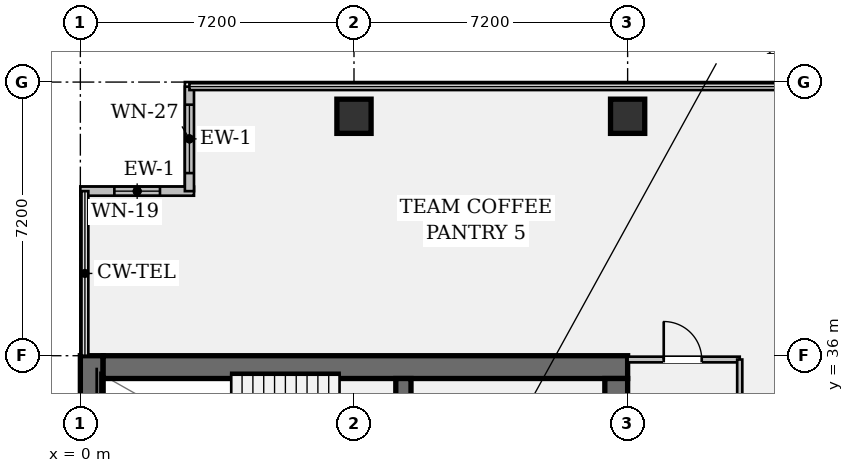
"""IFC4 building model, lengths in metres.
Left out: names, types, materials, properties, quantities, classifications, styles, units other than length and angle.
Written with IfcOpenShell. Run it as: python <this file> out.ifc"""

import sys

from ifc_helpers import new_model, si_unit, direction, frame, frame_2d, origin, origin_2d, place, context, subcontext, project, spatial, rectangle, hollow_rectangle, extrude, element, fill, save


model = new_model("IFC4")
c1 = context("Model", 3, precision=1e-05, world=origin(), true_north=direction((0.0, 1.0)))
c2 = subcontext(c1, "Body", "Model", "MODEL_VIEW")
j1 = project(units=[si_unit("LENGTHUNIT", "METRE"), si_unit("PLANEANGLEUNIT", "RADIAN")], contexts=[c1])
p1 = place(None, origin())
s1 = spatial("IfcSite", under=j1, at=p1, CompositionType="ELEMENT")
p2 = place(p1, origin())
s2 = spatial("IfcBuilding", under=s1, at=p2, CompositionType="ELEMENT")
p3 = place(p2, frame((0.0, 0.0, 121.45)))
s3 = spatial("IfcBuildingStorey", under=s2, at=p3, CompositionType="ELEMENT", Elevation=121.45)
p4 = place(p3, frame((0.3, 7.2, 0.0), z_axis=(0.0, 0.0, 1.0), x_axis=(0.0, 1.0, 0.0)))
e1 = element("IfcWall", 1, at=p4, inside=s3, PredefinedType="SHEAR", context=c2, shape_type="SweptSolid", body=[
    extrude(rectangle(XDim=28.8, YDim=0.6, at=frame_2d((14.4, 0.0))), origin(), (0.0, 0.0, 1.0), 3.58),
])
p5 = place(p3, frame((0.6, 35.7, 0.0), z_axis=(0.0, 0.0, 1.0), x_axis=(1.0, 0.0, 0.0)))
e2 = element("IfcWall", 2, at=p5, inside=s3, PredefinedType="SHEAR", context=c2, shape_type="SweptSolid", body=[
    extrude(rectangle(XDim=13.8, YDim=0.6, at=frame_2d((6.9, 0.0))), origin(), (0.0, 0.0, 1.0), 3.58),
])
p6 = place(p3, frame((14.1, 35.4, 0.0), z_axis=(0.0, 0.0, 1.0), x_axis=(0.0, -1.0, 0.0)))
e3 = element("IfcWall", 3, at=p6, inside=s3, PredefinedType="SHEAR", context=c2, shape_type="SweptSolid", body=[
    extrude(rectangle(XDim=27.6, YDim=0.6, at=frame_2d((13.8, 0.0))), origin(), (0.0, 0.0, 1.0), 3.58),
])
p7 = place(p6, frame((1.3, 0.0, 0.0)))
e4 = element("IfcOpeningElement", 4, at=p7, cuts=e3, PredefinedType="OPENING", context=c2, shape_type="SweptSolid", body=[
    extrude(rectangle(XDim=1.2, YDim=2.15, at=frame_2d((0.6, 1.075))), frame((0.0, 0.312, 0.0), z_axis=(0.0, -1.0, 0.0), x_axis=(1.0, 0.0, 0.0)), (0.0, 0.0, 1.0), 0.624),
])
p8 = place(p6, frame((25.25, 0.0, 0.0)))
e5 = element("IfcOpeningElement", 5, at=p8, cuts=e3, PredefinedType="OPENING", context=c2, shape_type="SweptSolid", body=[
    extrude(rectangle(XDim=1.2, YDim=2.15, at=frame_2d((0.6, 1.075))), frame((0.0, 0.312, 0.0), z_axis=(0.0, -1.0, 0.0), x_axis=(1.0, 0.0, 0.0)), (0.0, 0.0, 1.0), 0.624),
])
p9 = place(p6, frame((14.6, 0.0, 0.0)))
e6 = element("IfcOpeningElement", 6, at=p9, cuts=e3, PredefinedType="OPENING", context=c2, shape_type="SweptSolid", body=[
    extrude(rectangle(XDim=1.6, YDim=2.2, at=frame_2d((0.8, 1.1))), frame((0.0, 0.312, 0.0), z_axis=(0.0, -1.0, 0.0), x_axis=(1.0, 0.0, 0.0)), (0.0, 0.0, 1.0), 0.624),
])
p10 = place(p3, frame((8.5, 31.72, 0.0), z_axis=(0.0, 0.0, 1.0), x_axis=(0.0, 1.0, 0.0)))
e7 = element("IfcWall", 7, at=p10, inside=s3, PredefinedType="SHEAR", context=c2, shape_type="SweptSolid", body=[
    extrude(rectangle(XDim=3.68, YDim=0.4, at=frame_2d((1.84, 0.0))), origin(), (0.0, 0.0, 1.0), 3.58),
])
p11 = place(p10, frame((0.9, 0.0, 0.0)))
e8 = element("IfcOpeningElement", 8, at=p11, cuts=e7, PredefinedType="OPENING", context=c2, shape_type="SweptSolid", body=[
    extrude(rectangle(XDim=1.1, YDim=2.15, at=frame_2d((0.55, 1.075))), frame((0.0, 0.212, 0.0), z_axis=(0.0, -1.0, 0.0), x_axis=(1.0, 0.0, 0.0)), (0.0, 0.0, 1.0), 0.424),
])
for number, where, z_axis, x_axis in (
    (9, (7.2, 42.3, 0.0), (0.0, 0.0, 1.0), (1.0, 0.0, 0.0)),
    (10, (14.4, 42.3, 0.0), (0.0, 0.0, 1.0), (1.0, 0.0, 0.0)),
):
    element("IfcColumn", number, at=place(p3, frame(where, z_axis=z_axis, x_axis=x_axis)), inside=s3, PredefinedType="COLUMN", context=c2, shape_type="SweptSolid", body=[
        extrude(hollow_rectangle(XDim=0.9, YDim=0.9, WallThickness=0.055, at=origin_2d()), origin(), (0.0, 0.0, 1.0), 3.58),
    ])
p12 = place(p3, frame((0.0, 40.33, 0.0), z_axis=(0.0, 0.0, 1.0), x_axis=(1.0, 0.0, 0.0)))
e11 = element("IfcWall", 11, at=p12, inside=s3, PredefinedType="STANDARD", context=c2, shape_type="SweptSolid", body=[
    extrude(rectangle(XDim=2.99, YDim=0.24, at=frame_2d((1.495, 0.0))), origin(), (0.0, 0.0, 1.0), 3.58),
])
p13 = place(p12, frame((0.895, 0.0, 0.95)))
e12 = element("IfcOpeningElement", 12, at=p13, cuts=e11, PredefinedType="OPENING", context=c2, shape_type="SweptSolid", body=[
    extrude(rectangle(XDim=1.2, YDim=1.8, at=frame_2d((0.6, 0.9))), frame((0.0, 0.132, 0.0), z_axis=(0.0, -1.0, 0.0), x_axis=(1.0, 0.0, 0.0)), (0.0, 0.0, 1.0), 0.264),
])
p14 = place(p3, frame((2.87, 40.33, 0.0), z_axis=(0.0, 0.0, 1.0), x_axis=(0.0, 1.0, 0.0)))
e13 = element("IfcWall", 13, at=p14, inside=s3, PredefinedType="STANDARD", context=c2, shape_type="SweptSolid", body=[
    extrude(rectangle(XDim=2.75, YDim=0.24, at=frame_2d((1.375, 0.0))), origin(), (0.0, 0.0, 1.0), 3.58),
])
p15 = place(p14, frame((0.475, 0.0, 0.95)))
e14 = element("IfcOpeningElement", 14, at=p15, cuts=e13, PredefinedType="OPENING", context=c2, shape_type="SweptSolid", body=[
    extrude(rectangle(XDim=1.8, YDim=1.35, at=frame_2d((0.9, 0.675))), frame((0.0, 0.132, 0.0), z_axis=(0.0, -1.0, 0.0), x_axis=(1.0, 0.0, 0.0)), (0.0, 0.0, 1.0), 0.264),
])
p16 = place(p3, frame((14.4, 35.9, 0.0), z_axis=(0.0, 0.0, 1.0), x_axis=(1.0, 0.0, 0.0)))
e15 = element("IfcWall", 15, at=p16, inside=s3, PredefinedType="PARTITIONING", context=c2, shape_type="SweptSolid", body=[
    extrude(rectangle(XDim=2.95, YDim=0.15, at=frame_2d((1.475, 0.0))), origin(), (0.0, 0.0, 1.0), 2.869),
])
p17 = place(p16, frame((0.95, 0.0, 0.0)))
e16 = element("IfcOpeningElement", 16, at=p17, cuts=e15, PredefinedType="OPENING", context=c2, shape_type="SweptSolid", body=[
    extrude(rectangle(XDim=1.0, YDim=2.15, at=frame_2d((0.5, 1.075))), frame((0.0, 0.087, 0.0), z_axis=(0.0, -1.0, 0.0), x_axis=(1.0, 0.0, 0.0)), (0.0, 0.0, 1.0), 0.174),
])
p18 = place(p3, frame((17.35, 20.7, 0.0), z_axis=(0.0, 0.0, 1.0), x_axis=(0.0, 1.0, 0.0)))
e17 = element("IfcWall", 17, at=p18, inside=s3, PredefinedType="PARTITIONING", context=c2, shape_type="SweptSolid", body=[
    extrude(rectangle(XDim=15.2, YDim=0.135, at=frame_2d((7.6, 0.0))), origin(), (0.0, 0.0, 1.0), 2.869),
])
p19 = place(p18, frame((5.2, 0.0, 0.0)))
e18 = element("IfcOpeningElement", 18, at=p19, cuts=e17, PredefinedType="OPENING", context=c2, shape_type="SweptSolid", body=[
    extrude(rectangle(XDim=0.88, YDim=2.15, at=frame_2d((0.44, 1.075))), frame((0.0, 0.08, 0.0), z_axis=(0.0, -1.0, 0.0), x_axis=(1.0, 0.0, 0.0)), (0.0, 0.0, 1.0), 0.159),
])
p20 = place(p18, frame((10.6, 0.0, 0.0)))
e19 = element("IfcOpeningElement", 19, at=p20, cuts=e17, PredefinedType="OPENING", context=c2, shape_type="SweptSolid", body=[
    extrude(rectangle(XDim=1.0, YDim=2.15, at=frame_2d((0.5, 1.075))), frame((0.0, 0.08, 0.0), z_axis=(0.0, -1.0, 0.0), x_axis=(1.0, 0.0, 0.0)), (0.0, 0.0, 1.0), 0.159),
])
p21 = place(p13, origin())
e20 = element("IfcWindow", 20, at=p21, inside=s3, PartitioningType="SINGLE_PANEL", PredefinedType="WINDOW", context=c2, shape_type="SweptSolid", body=[
    extrude(rectangle(XDim=1.2, YDim=1.8, at=frame_2d((0.6, 0.9))), frame((0.0, 0.03, 0.0), z_axis=(0.0, -1.0, 0.0), x_axis=(1.0, 0.0, 0.0)), (0.0, 0.0, 1.0), 0.06),
])
fill(e12, e20)
p22 = place(p15, origin())
e21 = element("IfcWindow", 21, at=p22, inside=s3, PartitioningType="SINGLE_PANEL", PredefinedType="WINDOW", context=c2, shape_type="SweptSolid", body=[
    extrude(rectangle(XDim=1.8, YDim=1.35, at=frame_2d((0.9, 0.675))), frame((0.0, 0.03, 0.0), z_axis=(0.0, -1.0, 0.0), x_axis=(1.0, 0.0, 0.0)), (0.0, 0.0, 1.0), 0.06),
])
fill(e14, e21)
p23 = place(p17, origin())
e22 = element("IfcDoor", 22, at=p23, inside=s3, OperationType="SINGLE_SWING_LEFT", PredefinedType="DOOR", context=c2, shape_type="SweptSolid", body=[
    extrude(rectangle(XDim=1.0, YDim=2.15, at=frame_2d((0.5, 1.075))), frame((0.0, 0.025, 0.0), z_axis=(0.0, -1.0, 0.0), x_axis=(1.0, 0.0, 0.0)), (0.0, 0.0, 1.0), 0.05),
])
fill(e16, e22)
save(model, sys.argv[1])
